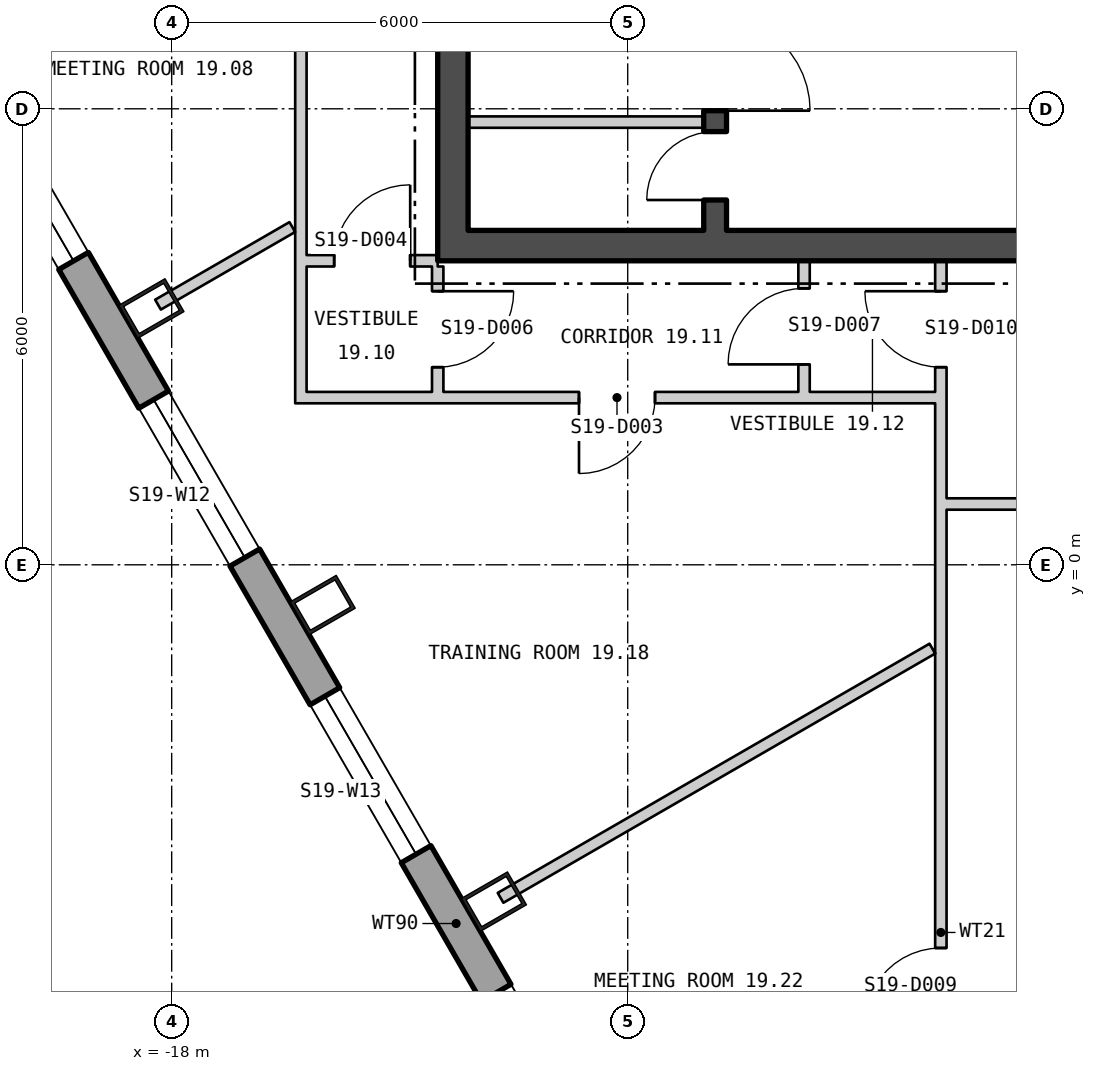
"""IFC4 building model, lengths in metres.
Left out: names, types, materials, properties, quantities, classifications, styles, units other than length and angle.
Written with IfcOpenShell. Run it as: python <this file> out.ifc"""

import sys

from ifc_helpers import new_model, si_unit, direction, frame, frame_2d, origin, origin_2d, place, context, subcontext, project, spatial, polyline, rectangle, hollow_rectangle, outline, extrude, element, fill, save


model = new_model("IFC4")
c1 = context("Model", 3, precision=1e-05, world=origin(), true_north=direction((0.0, 1.0)))
c2 = subcontext(c1, "Body", "Model", "MODEL_VIEW")
j1 = project(units=[si_unit("LENGTHUNIT", "METRE"), si_unit("PLANEANGLEUNIT", "RADIAN")], contexts=[c1])
p1 = place(None, origin())
s1 = spatial("IfcSite", under=j1, at=p1, CompositionType="ELEMENT")
p2 = place(p1, origin())
s2 = spatial("IfcBuilding", under=s1, at=p2, CompositionType="ELEMENT")
p3 = place(p2, frame((0.0, 0.0, 257.1)))
s3 = spatial("IfcBuildingStorey", under=s2, at=p3, CompositionType="ELEMENT", Elevation=257.1)
for number, where, z_axis, x_axis in (
    (1, (-18.266, 3.373, 0.0), (0.0, 0.0, 1.0), (0.5, -0.866, 0.0)),
    (2, (-16.013, -0.53, 0.0), (0.0, 0.0, 1.0), (0.5, -0.866, 0.0)),
    (3, (-13.76, -4.432, 0.0), (0.0, 0.0, 1.0), (0.5, -0.866, 0.0)),
):
    element("IfcColumn", number, at=place(p3, frame(where, z_axis=z_axis, x_axis=x_axis)), inside=s3, PredefinedType="COLUMN", context=c2, shape_type="SweptSolid", body=[
        extrude(hollow_rectangle(XDim=0.5, YDim=0.7, WallThickness=0.045, at=origin_2d()), origin(), (0.0, 0.0, 1.0), 3.9),
    ])
p4 = place(p3, frame((-25.69, 15.082, -0.18), z_axis=(0.0, 0.0, 1.0), x_axis=(0.500000141277, -0.866025322218, 0.0)))
e4 = element("IfcWall", 4, at=p4, inside=s3, PredefinedType="SOLIDWALL", context=c2, shape_type="SweptSolid", body=[
    extrude(outline(polyline([(-0.13, -0.225), (45.86, -0.225), (45.6, 0.225), (0.13, 0.225), (-0.13, -0.225)])), origin(), (0.0, 0.0, 1.0), 3.68),
])
p5 = place(p4, frame((1.424, 0.0, 1.08)))
e5 = element("IfcOpeningElement", 5, at=p5, cuts=e4, PredefinedType="OPENING", context=c2, shape_type="SweptSolid", body=[
    extrude(rectangle(XDim=2.4, YDim=2.0, at=frame_2d((1.2, 1.0))), frame((0.0, 0.235, 0.0), z_axis=(0.0, -1.0, 0.0), x_axis=(1.0, 0.0, 0.0)), (0.0, 0.0, 1.0), 0.47),
])
p6 = place(p4, frame((5.892, 0.0, 1.08)))
e6 = element("IfcOpeningElement", 6, at=p6, cuts=e4, PredefinedType="OPENING", context=c2, shape_type="SweptSolid", body=[
    extrude(rectangle(XDim=2.4, YDim=2.0, at=frame_2d((1.2, 1.0))), frame((0.0, 0.235, 0.0), z_axis=(0.0, -1.0, 0.0), x_axis=(1.0, 0.0, 0.0)), (0.0, 0.0, 1.0), 0.47),
])
p7 = place(p4, frame((10.399, 0.0, 1.08)))
e7 = element("IfcOpeningElement", 7, at=p7, cuts=e4, PredefinedType="OPENING", context=c2, shape_type="SweptSolid", body=[
    extrude(rectangle(XDim=2.4, YDim=2.0, at=frame_2d((1.2, 1.0))), frame((0.0, 0.235, 0.0), z_axis=(0.0, -1.0, 0.0), x_axis=(1.0, 0.0, 0.0)), (0.0, 0.0, 1.0), 0.47),
])
p8 = place(p4, frame((14.905, 0.0, 1.08)))
e8 = element("IfcOpeningElement", 8, at=p8, cuts=e4, PredefinedType="OPENING", context=c2, shape_type="SweptSolid", body=[
    extrude(rectangle(XDim=2.4, YDim=2.0, at=frame_2d((1.2, 1.0))), frame((0.0, 0.235, 0.0), z_axis=(0.0, -1.0, 0.0), x_axis=(1.0, 0.0, 0.0)), (0.0, 0.0, 1.0), 0.47),
])
p9 = place(p4, frame((19.412, 0.0, 1.08)))
e9 = element("IfcOpeningElement", 9, at=p9, cuts=e4, PredefinedType="OPENING", context=c2, shape_type="SweptSolid", body=[
    extrude(rectangle(XDim=2.4, YDim=2.0, at=frame_2d((1.2, 1.0))), frame((0.0, 0.235, 0.0), z_axis=(0.0, -1.0, 0.0), x_axis=(1.0, 0.0, 0.0)), (0.0, 0.0, 1.0), 0.47),
])
p10 = place(p4, frame((23.918, 0.0, 1.08)))
e10 = element("IfcOpeningElement", 10, at=p10, cuts=e4, PredefinedType="OPENING", context=c2, shape_type="SweptSolid", body=[
    extrude(rectangle(XDim=2.4, YDim=2.0, at=frame_2d((1.2, 1.0))), frame((0.0, 0.235, 0.0), z_axis=(0.0, -1.0, 0.0), x_axis=(1.0, 0.0, 0.0)), (0.0, 0.0, 1.0), 0.47),
])
p11 = place(p4, frame((28.425, 0.0, 1.08)))
e11 = element("IfcOpeningElement", 11, at=p11, cuts=e4, PredefinedType="OPENING", context=c2, shape_type="SweptSolid", body=[
    extrude(rectangle(XDim=2.4, YDim=2.0, at=frame_2d((1.2, 1.0))), frame((0.0, 0.235, 0.0), z_axis=(0.0, -1.0, 0.0), x_axis=(1.0, 0.0, 0.0)), (0.0, 0.0, 1.0), 0.47),
])
p12 = place(p4, frame((32.932, 0.0, 1.08)))
e12 = element("IfcOpeningElement", 12, at=p12, cuts=e4, PredefinedType="OPENING", context=c2, shape_type="SweptSolid", body=[
    extrude(rectangle(XDim=2.4, YDim=2.0, at=frame_2d((1.2, 1.0))), frame((0.0, 0.235, 0.0), z_axis=(0.0, -1.0, 0.0), x_axis=(1.0, 0.0, 0.0)), (0.0, 0.0, 1.0), 0.47),
])
p13 = place(p4, frame((37.438, 0.0, 1.08)))
e13 = element("IfcOpeningElement", 13, at=p13, cuts=e4, PredefinedType="OPENING", context=c2, shape_type="SweptSolid", body=[
    extrude(rectangle(XDim=2.4, YDim=2.0, at=frame_2d((1.2, 1.0))), frame((0.0, 0.235, 0.0), z_axis=(0.0, -1.0, 0.0), x_axis=(1.0, 0.0, 0.0)), (0.0, 0.0, 1.0), 0.47),
])
p14 = place(p4, frame((41.907, 0.0, 1.08)))
e14 = element("IfcOpeningElement", 14, at=p14, cuts=e4, PredefinedType="OPENING", context=c2, shape_type="SweptSolid", body=[
    extrude(rectangle(XDim=2.4, YDim=2.0, at=frame_2d((1.2, 1.0))), frame((0.0, 0.235, 0.0), z_axis=(0.0, -1.0, 0.0), x_axis=(1.0, 0.0, 0.0)), (0.0, 0.0, 1.0), 0.47),
])
p15 = place(p3, frame((-14.5, 4.2, 0.0), z_axis=(0.0, 0.0, 1.0), x_axis=(1.0, 0.0, 0.0)))
e15 = element("IfcWall", 15, at=p15, inside=s3, PredefinedType="SHEAR", context=c2, shape_type="SweptSolid", body=[
    extrude(rectangle(XDim=29.0, YDim=0.4, at=frame_2d((14.5, 0.0))), origin(), (0.0, 0.0, 1.0), 3.7),
])
p16 = place(p15, frame((9.0, 0.0, 0.0)))
e16 = element("IfcOpeningElement", 16, at=p16, cuts=e15, PredefinedType="OPENING", context=c2, shape_type="SweptSolid", body=[
    extrude(rectangle(XDim=1.8, YDim=2.4, at=frame_2d((0.9, 1.2))), frame((0.0, 0.21, 0.0), z_axis=(0.0, -1.0, 0.0), x_axis=(1.0, 0.0, 0.0)), (0.0, 0.0, 1.0), 0.42),
])
p17 = place(p15, frame((19.0, 0.0, 0.0)))
e17 = element("IfcOpeningElement", 17, at=p17, cuts=e15, PredefinedType="OPENING", context=c2, shape_type="SweptSolid", body=[
    extrude(rectangle(XDim=1.8, YDim=2.4, at=frame_2d((0.9, 1.2))), frame((0.0, 0.21, 0.0), z_axis=(0.0, -1.0, 0.0), x_axis=(1.0, 0.0, 0.0)), (0.0, 0.0, 1.0), 0.42),
])
p18 = place(p3, frame((-14.3, 4.4, 0.0), z_axis=(0.0, 0.0, 1.0), x_axis=(0.0, 1.0, 0.0)))
e18 = element("IfcWall", 18, at=p18, inside=s3, PredefinedType="SHEAR", context=c2, shape_type="SweptSolid", body=[
    extrude(rectangle(XDim=13.2, YDim=0.4, at=frame_2d((6.6, 0.0))), origin(), (0.0, 0.0, 1.0), 3.7),
])
p19 = place(p18, frame((3.05, 0.0, 0.0)))
e19 = element("IfcOpeningElement", 19, at=p19, cuts=e18, PredefinedType="OPENING", context=c2, shape_type="SweptSolid", body=[
    extrude(rectangle(XDim=1.5, YDim=2.1, at=frame_2d((0.75, 1.05))), frame((0.0, 0.21, 0.0), z_axis=(0.0, -1.0, 0.0), x_axis=(1.0, 0.0, 0.0)), (0.0, 0.0, 1.0), 0.42),
])
p20 = place(p3, frame((-10.85, 4.4, 0.0), z_axis=(0.0, 0.0, 1.0), x_axis=(0.0, 1.0, 0.0)))
e20 = element("IfcWall", 20, at=p20, inside=s3, PredefinedType="SHEAR", context=c2, shape_type="SweptSolid", body=[
    extrude(rectangle(XDim=13.2, YDim=0.3, at=frame_2d((6.6, 0.0))), origin(), (0.0, 0.0, 1.0), 3.7),
])
p21 = place(p20, frame((1.575, 0.0, 0.0)))
e21 = element("IfcOpeningElement", 21, at=p21, cuts=e20, PredefinedType="OPENING", context=c2, shape_type="SweptSolid", body=[
    extrude(rectangle(XDim=1.25, YDim=2.1, at=frame_2d((0.625, 1.05))), frame((0.0, 0.16, 0.0), z_axis=(0.0, -1.0, 0.0), x_axis=(1.0, 0.0, 0.0)), (0.0, 0.0, 1.0), 0.32),
])
p22 = place(p20, frame((0.4, 0.0, 0.0)))
e22 = element("IfcOpeningElement", 22, at=p22, cuts=e20, PredefinedType="OPENING", context=c2, shape_type="SweptSolid", body=[
    extrude(rectangle(XDim=0.9, YDim=2.1, at=frame_2d((0.45, 1.05))), frame((0.0, 0.16, 0.0), z_axis=(0.0, -1.0, 0.0), x_axis=(1.0, 0.0, 0.0)), (0.0, 0.0, 1.0), 0.32),
])
p23 = place(p3, frame((-14.1, 5.825, 0.0), z_axis=(0.0, 0.0, 1.0), x_axis=(1.0, 0.0, 0.0)))
e23 = element("IfcWall", 23, at=p23, inside=s3, PredefinedType="PARTITIONING", context=c2, shape_type="SweptSolid", body=[
    extrude(rectangle(XDim=3.1, YDim=0.15, at=frame_2d((1.55, 0.0))), origin(), (0.0, 0.0, 1.0), 3.7),
])
p24 = place(p3, frame((-18.18, 3.423, 0.0), z_axis=(0.0, 0.0, 1.0), x_axis=(0.865850922242, 0.500302089196, 0.0)))
e24 = element("IfcWall", 24, at=p24, inside=s3, PredefinedType="PARTITIONING", context=c2, shape_type="SweptSolid", body=[
    extrude(rectangle(XDim=2.041, YDim=0.15, at=frame_2d((1.02, 0.0))), origin(), (0.0, 0.0, 1.0), 3.7),
])
p25 = place(p3, frame((-16.3, 2.125, 0.0), z_axis=(0.0, 0.0, 1.0), x_axis=(0.0, 1.0, 0.0)))
e25 = element("IfcWall", 25, at=p25, inside=s3, PredefinedType="PARTITIONING", context=c2, shape_type="SweptSolid", body=[
    extrude(rectangle(XDim=15.459, YDim=0.15, at=frame_2d((7.729, 0.0))), origin(), (0.0, 0.0, 1.0), 3.7),
])
p26 = place(p25, frame((5.99, 0.0, 0.0)))
e26 = element("IfcOpeningElement", 26, at=p26, cuts=e25, PredefinedType="OPENING", context=c2, shape_type="SweptSolid", body=[
    extrude(rectangle(XDim=1.0, YDim=2.1, at=frame_2d((0.5, 1.05))), frame((0.0, 0.085, 0.0), z_axis=(0.0, -1.0, 0.0), x_axis=(1.0, 0.0, 0.0)), (0.0, 0.0, 1.0), 0.17),
])
p27 = place(p25, frame((12.554, 0.0, 0.0)))
e27 = element("IfcOpeningElement", 27, at=p27, cuts=e25, PredefinedType="OPENING", context=c2, shape_type="SweptSolid", body=[
    extrude(rectangle(XDim=1.0, YDim=2.1, at=frame_2d((0.5, 1.05))), frame((0.0, 0.085, 0.0), z_axis=(0.0, -1.0, 0.0), x_axis=(1.0, 0.0, 0.0)), (0.0, 0.0, 1.0), 0.17),
])
p28 = place(p3, frame((-16.225, 2.2, 0.0), z_axis=(0.0, 0.0, 1.0), x_axis=(1.0, 0.0, 0.0)))
e28 = element("IfcWall", 28, at=p28, inside=s3, PredefinedType="PARTITIONING", context=c2, shape_type="SweptSolid", body=[
    extrude(rectangle(XDim=8.27, YDim=0.15, at=frame_2d((4.135, 0.0))), origin(), (0.0, 0.0, 1.0), 3.7),
])
p29 = place(p28, frame((3.584, 0.0, 0.0)))
e29 = element("IfcOpeningElement", 29, at=p29, cuts=e28, PredefinedType="OPENING", context=c2, shape_type="SweptSolid", body=[
    extrude(rectangle(XDim=1.0, YDim=2.1, at=frame_2d((0.5, 1.05))), frame((0.0, 0.085, 0.0), z_axis=(0.0, -1.0, 0.0), x_axis=(1.0, 0.0, 0.0)), (0.0, 0.0, 1.0), 0.17),
])
p30 = place(p3, frame((-16.225, 4.0, 0.0), z_axis=(0.0, 0.0, 1.0), x_axis=(1.0, 0.0, 0.0)))
e30 = element("IfcWall", 30, at=p30, inside=s3, PredefinedType="PARTITIONING", context=c2, shape_type="SweptSolid", body=[
    extrude(rectangle(XDim=1.725, YDim=0.15, at=frame_2d((0.863, 0.0))), origin(), (0.0, 0.0, 1.0), 3.16),
])
p31 = place(p30, frame((0.363, 0.0, 0.0)))
e31 = element("IfcOpeningElement", 31, at=p31, cuts=e30, PredefinedType="OPENING", context=c2, shape_type="SweptSolid", body=[
    extrude(rectangle(XDim=1.0, YDim=2.1, at=frame_2d((0.5, 1.05))), frame((0.0, 0.085, 0.0), z_axis=(0.0, -1.0, 0.0), x_axis=(1.0, 0.0, 0.0)), (0.0, 0.0, 1.0), 0.17),
])
p32 = place(p3, frame((-14.5, 2.275, 0.0), z_axis=(0.0, 0.0, 1.0), x_axis=(0.0, 1.0, 0.0)))
e32 = element("IfcWall", 32, at=p32, inside=s3, PredefinedType="PARTITIONING", context=c2, shape_type="SweptSolid", body=[
    extrude(rectangle(XDim=1.65, YDim=0.15, at=frame_2d((0.825, 0.0))), origin(), (0.0, 0.0, 1.0), 3.7),
])
p33 = place(p32, frame((0.325, 0.0, 0.0)))
e33 = element("IfcOpeningElement", 33, at=p33, cuts=e32, PredefinedType="OPENING", context=c2, shape_type="SweptSolid", body=[
    extrude(rectangle(XDim=1.0, YDim=2.1, at=frame_2d((0.5, 1.05))), frame((0.0, 0.085, 0.0), z_axis=(0.0, -1.0, 0.0), x_axis=(1.0, 0.0, 0.0)), (0.0, 0.0, 1.0), 0.17),
])
p34 = place(p3, frame((-13.673, -4.382, 0.0), z_axis=(0.0, 0.0, 1.0), x_axis=(0.866086584464, 0.499894016979, 0.0)))
e34 = element("IfcWall", 34, at=p34, inside=s3, PredefinedType="PARTITIONING", context=c2, shape_type="SweptSolid", body=[
    extrude(rectangle(XDim=6.559, YDim=0.15, at=frame_2d((3.28, 0.0))), origin(), (0.0, 0.0, 1.0), 3.7),
])
p35 = place(p3, frame((-9.68, 2.275, 0.0), z_axis=(0.0, 0.0, 1.0), x_axis=(0.0, 1.0, 0.0)))
e35 = element("IfcWall", 35, at=p35, inside=s3, PredefinedType="PARTITIONING", context=c2, shape_type="SweptSolid", body=[
    extrude(rectangle(XDim=1.725, YDim=0.15, at=frame_2d((0.863, 0.0))), origin(), (0.0, 0.0, 1.0), 3.7),
])
p36 = place(p35, frame((0.362, 0.0, 0.0)))
e36 = element("IfcOpeningElement", 36, at=p36, cuts=e35, PredefinedType="OPENING", context=c2, shape_type="SweptSolid", body=[
    extrude(rectangle(XDim=1.0, YDim=2.1, at=frame_2d((0.5, 1.05))), frame((0.0, 0.085, 0.0), z_axis=(0.0, -1.0, 0.0), x_axis=(1.0, 0.0, 0.0)), (0.0, 0.0, 1.0), 0.17),
])
p37 = place(p3, frame((-7.88, -13.675, 0.0), z_axis=(0.0, 0.0, 1.0), x_axis=(0.0, 1.0, 0.0)))
e37 = element("IfcWall", 37, at=p37, inside=s3, PredefinedType="PARTITIONING", context=c2, shape_type="SweptSolid", body=[
    extrude(rectangle(XDim=17.675, YDim=0.15, at=frame_2d((8.838, 0.0))), origin(), (0.0, 0.0, 1.0), 3.7),
])
p38 = place(p37, frame((4.331, 0.0, 0.0)))
e38 = element("IfcOpeningElement", 38, at=p38, cuts=e37, PredefinedType="OPENING", context=c2, shape_type="SweptSolid", body=[
    extrude(rectangle(XDim=1.0, YDim=2.1, at=frame_2d((0.5, 1.05))), frame((0.0, 0.085, 0.0), z_axis=(0.0, -1.0, 0.0), x_axis=(1.0, 0.0, 0.0)), (0.0, 0.0, 1.0), 0.17),
])
p39 = place(p37, frame((7.633, 0.0, 0.0)))
e39 = element("IfcOpeningElement", 39, at=p39, cuts=e37, PredefinedType="OPENING", context=c2, shape_type="SweptSolid", body=[
    extrude(rectangle(XDim=1.0, YDim=2.1, at=frame_2d((0.5, 1.05))), frame((0.0, 0.085, 0.0), z_axis=(0.0, -1.0, 0.0), x_axis=(1.0, 0.0, 0.0)), (0.0, 0.0, 1.0), 0.17),
])
p40 = place(p37, frame((16.275, 0.0, 0.0)))
e40 = element("IfcOpeningElement", 40, at=p40, cuts=e37, PredefinedType="OPENING", context=c2, shape_type="SweptSolid", body=[
    extrude(rectangle(XDim=1.0, YDim=2.1, at=frame_2d((0.5, 1.05))), frame((0.0, 0.085, 0.0), z_axis=(0.0, -1.0, 0.0), x_axis=(1.0, 0.0, 0.0)), (0.0, 0.0, 1.0), 0.17),
])
p41 = place(p3, frame((-7.805, 0.8, 0.0), z_axis=(0.0, 0.0, 1.0), x_axis=(1.0, 0.0, 0.0)))
e41 = element("IfcWall", 41, at=p41, inside=s3, PredefinedType="PARTITIONING", context=c2, shape_type="SweptSolid", body=[
    extrude(rectangle(XDim=15.61, YDim=0.15, at=frame_2d((7.805, 0.0))), origin(), (0.0, 0.0, 1.0), 3.7),
])
p42 = place(p41, frame((1.168, 0.0, 0.0)))
e42 = element("IfcOpeningElement", 42, at=p42, cuts=e41, PredefinedType="OPENING", context=c2, shape_type="SweptSolid", body=[
    extrude(rectangle(XDim=1.0, YDim=2.1, at=frame_2d((0.5, 1.05))), frame((0.0, 0.085, 0.0), z_axis=(0.0, -1.0, 0.0), x_axis=(1.0, 0.0, 0.0)), (0.0, 0.0, 1.0), 0.17),
])
p43 = place(p41, frame((6.399, 0.0, 0.0)))
e43 = element("IfcOpeningElement", 43, at=p43, cuts=e41, PredefinedType="OPENING", context=c2, shape_type="SweptSolid", body=[
    extrude(rectangle(XDim=1.0, YDim=2.1, at=frame_2d((0.5, 1.05))), frame((0.0, 0.085, 0.0), z_axis=(0.0, -1.0, 0.0), x_axis=(1.0, 0.0, 0.0)), (0.0, 0.0, 1.0), 0.17),
])
p44 = place(p41, frame((8.006, 0.0, 0.0)))
e44 = element("IfcOpeningElement", 44, at=p44, cuts=e41, PredefinedType="OPENING", context=c2, shape_type="SweptSolid", body=[
    extrude(rectangle(XDim=1.0, YDim=2.1, at=frame_2d((0.5, 1.05))), frame((0.0, 0.085, 0.0), z_axis=(0.0, -1.0, 0.0), x_axis=(1.0, 0.0, 0.0)), (0.0, 0.0, 1.0), 0.17),
])
p45 = place(p41, frame((13.441, 0.0, 0.0)))
e45 = element("IfcOpeningElement", 45, at=p45, cuts=e41, PredefinedType="OPENING", context=c2, shape_type="SweptSolid", body=[
    extrude(rectangle(XDim=1.0, YDim=2.1, at=frame_2d((0.5, 1.05))), frame((0.0, 0.085, 0.0), z_axis=(0.0, -1.0, 0.0), x_axis=(1.0, 0.0, 0.0)), (0.0, 0.0, 1.0), 0.17),
])
p46 = place(p7, origin())
e46 = element("IfcWindow", 46, at=p46, inside=s3, PartitioningType="SINGLE_PANEL", PredefinedType="WINDOW", context=c2, shape_type="SweptSolid", body=[
    extrude(rectangle(XDim=2.4, YDim=2.0, at=frame_2d((1.2, 1.0))), frame((0.0, 0.105, 0.0), z_axis=(0.0, -1.0, 0.0), x_axis=(1.0, 0.0, 0.0)), (0.0, 0.0, 1.0), 0.06),
])
fill(e7, e46)
p47 = place(p8, origin())
e47 = element("IfcWindow", 47, at=p47, inside=s3, PartitioningType="SINGLE_PANEL", PredefinedType="WINDOW", context=c2, shape_type="SweptSolid", body=[
    extrude(rectangle(XDim=2.4, YDim=2.0, at=frame_2d((1.2, 1.0))), frame((0.0, 0.105, 0.0), z_axis=(0.0, -1.0, 0.0), x_axis=(1.0, 0.0, 0.0)), (0.0, 0.0, 1.0), 0.06),
])
fill(e8, e47)
p48 = place(p9, origin())
e48 = element("IfcWindow", 48, at=p48, inside=s3, PartitioningType="SINGLE_PANEL", PredefinedType="WINDOW", context=c2, shape_type="SweptSolid", body=[
    extrude(rectangle(XDim=2.4, YDim=2.0, at=frame_2d((1.2, 1.0))), frame((0.0, 0.105, 0.0), z_axis=(0.0, -1.0, 0.0), x_axis=(1.0, 0.0, 0.0)), (0.0, 0.0, 1.0), 0.06),
])
fill(e9, e48)
p49 = place(p10, origin())
e49 = element("IfcWindow", 49, at=p49, inside=s3, PartitioningType="SINGLE_PANEL", PredefinedType="WINDOW", context=c2, shape_type="SweptSolid", body=[
    extrude(rectangle(XDim=2.4, YDim=2.0, at=frame_2d((1.2, 1.0))), frame((0.0, 0.105, 0.0), z_axis=(0.0, -1.0, 0.0), x_axis=(1.0, 0.0, 0.0)), (0.0, 0.0, 1.0), 0.06),
])
fill(e10, e49)
p50 = place(p21, origin())
e50 = element("IfcDoor", 50, at=p50, inside=s3, OperationType="SINGLE_SWING_LEFT", PredefinedType="DOOR", context=c2, shape_type="SweptSolid", body=[
    extrude(rectangle(XDim=1.25, YDim=2.1, at=frame_2d((0.625, 1.05))), frame((0.0, 0.025, 0.0), z_axis=(0.0, -1.0, 0.0), x_axis=(1.0, 0.0, 0.0)), (0.0, 0.0, 1.0), 0.05),
])
fill(e21, e50)
p51 = place(p22, origin())
e51 = element("IfcDoor", 51, at=p51, inside=s3, OperationType="SINGLE_SWING_RIGHT", PredefinedType="DOOR", context=c2, shape_type="SweptSolid", body=[
    extrude(rectangle(XDim=0.9, YDim=2.1, at=frame_2d((0.45, 1.05))), frame((0.0, 0.025, 0.0), z_axis=(0.0, -1.0, 0.0), x_axis=(1.0, 0.0, 0.0)), (0.0, 0.0, 1.0), 0.05),
])
fill(e22, e51)
p52 = place(p29, origin())
e52 = element("IfcDoor", 52, at=p52, inside=s3, OperationType="SINGLE_SWING_LEFT", PredefinedType="DOOR", context=c2, shape_type="SweptSolid", body=[
    extrude(rectangle(XDim=1.0, YDim=2.1, at=frame_2d((0.5, 1.05))), frame((0.0, 0.025, 0.0), z_axis=(0.0, -1.0, 0.0), x_axis=(1.0, 0.0, 0.0)), (0.0, 0.0, 1.0), 0.05),
])
fill(e29, e52)
p53 = place(p31, origin())
e53 = element("IfcDoor", 53, at=p53, inside=s3, OperationType="SINGLE_SWING_LEFT", PredefinedType="DOOR", context=c2, shape_type="SweptSolid", body=[
    extrude(rectangle(XDim=1.0, YDim=2.1, at=frame_2d((0.5, 1.05))), frame((0.0, 0.025, 0.0), z_axis=(0.0, -1.0, 0.0), x_axis=(1.0, 0.0, 0.0)), (0.0, 0.0, 1.0), 0.05),
])
fill(e31, e53)
p54 = place(p33, origin())
e54 = element("IfcDoor", 54, at=p54, inside=s3, OperationType="SINGLE_SWING_RIGHT", PredefinedType="DOOR", context=c2, shape_type="SweptSolid", body=[
    extrude(rectangle(XDim=1.0, YDim=2.1, at=frame_2d((0.5, 1.05))), frame((0.0, 0.025, 0.0), z_axis=(0.0, -1.0, 0.0), x_axis=(1.0, 0.0, 0.0)), (0.0, 0.0, 1.0), 0.05),
])
fill(e33, e54)
p55 = place(p36, origin())
e55 = element("IfcDoor", 55, at=p55, inside=s3, OperationType="SINGLE_SWING_RIGHT", PredefinedType="DOOR", context=c2, shape_type="SweptSolid", body=[
    extrude(rectangle(XDim=1.0, YDim=2.1, at=frame_2d((0.5, 1.05))), frame((0.0, 0.025, 0.0), z_axis=(0.0, -1.0, 0.0), x_axis=(1.0, 0.0, 0.0)), (0.0, 0.0, 1.0), 0.05),
])
fill(e36, e55)
p56 = place(p39, origin())
e56 = element("IfcDoor", 56, at=p56, inside=s3, OperationType="SINGLE_SWING_RIGHT", PredefinedType="DOOR", context=c2, shape_type="SweptSolid", body=[
    extrude(rectangle(XDim=1.0, YDim=2.1, at=frame_2d((0.5, 1.05))), frame((0.0, 0.025, 0.0), z_axis=(0.0, -1.0, 0.0), x_axis=(1.0, 0.0, 0.0)), (0.0, 0.0, 1.0), 0.05),
])
fill(e39, e56)
p57 = place(p40, origin())
e57 = element("IfcDoor", 57, at=p57, inside=s3, OperationType="SINGLE_SWING_LEFT", PredefinedType="DOOR", context=c2, shape_type="SweptSolid", body=[
    extrude(rectangle(XDim=1.0, YDim=2.1, at=frame_2d((0.5, 1.05))), frame((0.0, 0.025, 0.0), z_axis=(0.0, -1.0, 0.0), x_axis=(1.0, 0.0, 0.0)), (0.0, 0.0, 1.0), 0.05),
])
fill(e40, e57)
save(model, sys.argv[1])
